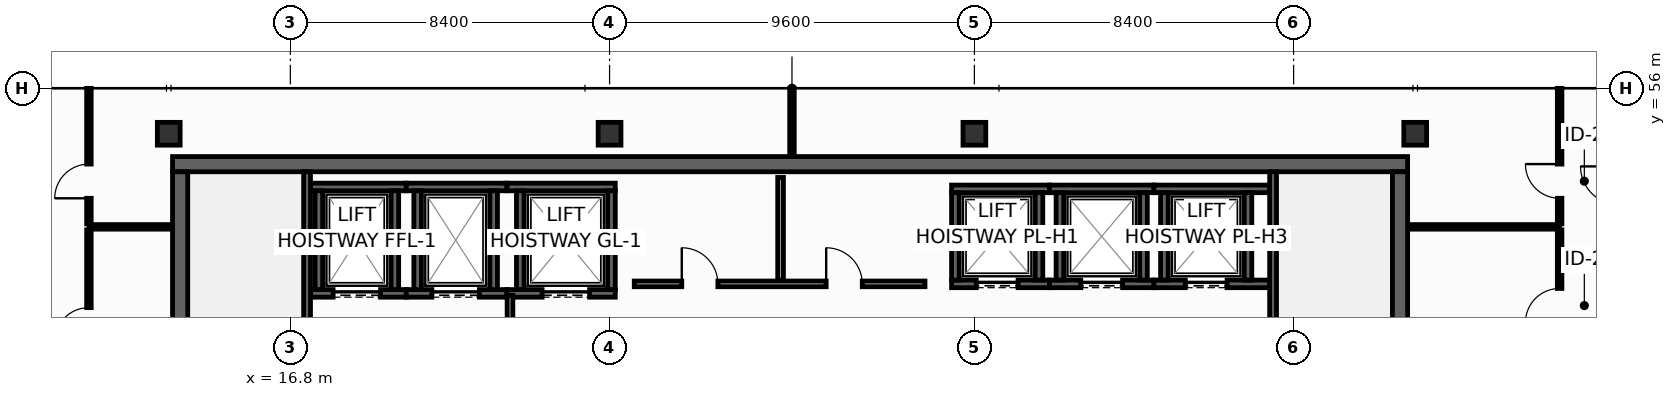
"""IFC4 building model, lengths in metres.
Left out: names, types, materials, properties, quantities, classifications, styles, units other than length and angle.
Written with IfcOpenShell. Run it as: python <this file> out.ifc"""

import sys

from ifc_helpers import new_model, si_unit, direction, frame, frame_2d, origin, origin_2d, place, context, subcontext, project, spatial, rectangle, hollow_rectangle, extrude, element, fill, save


model = new_model("IFC4")
c1 = context("Model", 3, precision=1e-05, world=origin(), true_north=direction((0.0, 1.0)))
c2 = subcontext(c1, "Body", "Model", "MODEL_VIEW")
j1 = project(units=[si_unit("LENGTHUNIT", "METRE"), si_unit("PLANEANGLEUNIT", "RADIAN")], contexts=[c1])
p1 = place(None, origin())
s1 = spatial("IfcSite", under=j1, at=p1, CompositionType="ELEMENT")
p2 = place(p1, origin())
s2 = spatial("IfcBuilding", under=s1, at=p2, CompositionType="ELEMENT")
p3 = place(p2, frame((0.0, 0.0, 302.8)))
s3 = spatial("IfcBuildingStorey", under=s2, at=p3, CompositionType="ELEMENT", Elevation=302.8)
p4 = place(p3, frame((13.7, 54.0, 0.0), z_axis=(0.0, 0.0, 1.0), x_axis=(1.0, 0.0, 0.0)))
e1 = element("IfcWall", 1, at=p4, inside=s3, PredefinedType="SHEAR", context=c2, shape_type="SweptSolid", body=[
    extrude(rectangle(XDim=32.5, YDim=0.4, at=frame_2d((16.25, 0.0))), origin(), (0.0, 0.0, 1.0), 3.55),
])
for number, where, z_axis, x_axis in (
    (2, (13.9, 43.4, 0.0), (0.0, 0.0, 1.0), (0.0, 1.0, 0.0)),
    (3, (46.0, 43.4, 0.0), (0.0, 0.0, 1.0), (0.0, 1.0, 0.0)),
):
    element("IfcWall", number, at=place(p3, frame(where, z_axis=z_axis, x_axis=x_axis)), inside=s3, PredefinedType="SHEAR", context=c2, shape_type="SweptSolid", body=[
        extrude(rectangle(XDim=10.4, YDim=0.4, at=frame_2d((5.2, 0.0))), origin(), (0.0, 0.0, 1.0), 3.55),
    ])
for number, where, z_axis, x_axis in (
    (4, (13.6, 54.8, 0.0), (0.0, 0.0, 1.0), (1.0, 0.0, 0.0)),
    (5, (25.2, 54.8, 0.0), (0.0, 0.0, 1.0), (1.0, 0.0, 0.0)),
    (6, (34.8, 54.8, 0.0), (0.0, 0.0, 1.0), (1.0, 0.0, 0.0)),
    (7, (46.4, 54.8, 0.0), (0.0, 0.0, 1.0), (1.0, 0.0, 0.0)),
):
    element("IfcColumn", number, at=place(p3, frame(where, z_axis=z_axis, x_axis=x_axis)), inside=s3, PredefinedType="COLUMN", context=c2, shape_type="SweptSolid", body=[
        extrude(hollow_rectangle(XDim=0.6, YDim=0.6, WallThickness=0.028, at=origin_2d()), origin(), (0.0, 0.0, 1.0), 3.8),
    ])
p5 = place(p3, frame((17.33, 50.6, 0.0), z_axis=(0.0, 0.0, 1.0), x_axis=(1.0, 0.0, 0.0)))
e8 = element("IfcWall", 8, at=p5, inside=s3, PredefinedType="SHEAR", context=c2, shape_type="SweptSolid", body=[
    extrude(rectangle(XDim=2.52, YDim=0.2, at=frame_2d((1.26, 0.0))), origin(), (0.0, 0.0, 1.0), 3.55),
])
p6 = place(p5, frame((0.595, 0.0, 0.0)))
e9 = element("IfcOpeningElement", 9, at=p6, cuts=e8, PredefinedType="OPENING", context=c2, shape_type="SweptSolid", body=[
    extrude(rectangle(XDim=1.25, YDim=2.3, at=frame_2d((0.625, 1.15))), frame((0.0, 0.11, 0.0), z_axis=(0.0, -1.0, 0.0), x_axis=(1.0, 0.0, 0.0)), (0.0, 0.0, 1.0), 0.22),
])
p7 = place(p3, frame((17.33, 53.4, 0.0), z_axis=(0.0, 0.0, 1.0), x_axis=(1.0, 0.0, 0.0)))
e10 = element("IfcWall", 10, at=p7, inside=s3, PredefinedType="SHEAR", context=c2, shape_type="SweptSolid", body=[
    extrude(rectangle(XDim=2.52, YDim=0.2, at=frame_2d((1.26, 0.0))), origin(), (0.0, 0.0, 1.0), 3.55),
])
for number, where, z_axis, x_axis in (
    (11, (17.55, 50.7, 0.0), (0.0, 0.0, 1.0), (0.0, 1.0, 0.0)),
    (12, (19.55, 50.7, 0.0), (0.0, 0.0, 1.0), (0.0, 1.0, 0.0)),
):
    element("IfcWall", number, at=place(p3, frame(where, z_axis=z_axis, x_axis=x_axis)), inside=s3, PredefinedType="SHEAR", context=c2, shape_type="SweptSolid", body=[
        extrude(rectangle(XDim=2.6, YDim=0.2, at=frame_2d((1.3, 0.0))), origin(), (0.0, 0.0, 1.0), 3.55),
    ])
p8 = place(p3, frame((19.85, 50.6, 0.0), z_axis=(0.0, 0.0, 1.0), x_axis=(1.0, 0.0, 0.0)))
e13 = element("IfcWall", 13, at=p8, inside=s3, PredefinedType="SHEAR", context=c2, shape_type="SweptSolid", body=[
    extrude(rectangle(XDim=2.65, YDim=0.2, at=frame_2d((1.325, 0.0))), origin(), (0.0, 0.0, 1.0), 3.55),
])
p9 = place(p8, frame((0.675, 0.0, 0.0)))
e14 = element("IfcOpeningElement", 14, at=p9, cuts=e13, PredefinedType="OPENING", context=c2, shape_type="SweptSolid", body=[
    extrude(rectangle(XDim=1.25, YDim=2.3, at=frame_2d((0.625, 1.15))), frame((0.0, 0.11, 0.0), z_axis=(0.0, -1.0, 0.0), x_axis=(1.0, 0.0, 0.0)), (0.0, 0.0, 1.0), 0.22),
])
p10 = place(p3, frame((19.85, 53.4, 0.0), z_axis=(0.0, 0.0, 1.0), x_axis=(1.0, 0.0, 0.0)))
e15 = element("IfcWall", 15, at=p10, inside=s3, PredefinedType="SHEAR", context=c2, shape_type="SweptSolid", body=[
    extrude(rectangle(XDim=2.65, YDim=0.2, at=frame_2d((1.325, 0.0))), origin(), (0.0, 0.0, 1.0), 3.55),
])
for number, where, z_axis, x_axis in (
    (16, (20.15, 50.7, 0.0), (0.0, 0.0, 1.0), (0.0, 1.0, 0.0)),
    (17, (22.15, 50.7, 0.0), (0.0, 0.0, 1.0), (0.0, 1.0, 0.0)),
):
    element("IfcWall", number, at=place(p3, frame(where, z_axis=z_axis, x_axis=x_axis)), inside=s3, PredefinedType="SHEAR", context=c2, shape_type="SweptSolid", body=[
        extrude(rectangle(XDim=2.6, YDim=0.2, at=frame_2d((1.3, 0.0))), origin(), (0.0, 0.0, 1.0), 3.55),
    ])
p11 = place(p3, frame((22.5, 50.6, 0.0), z_axis=(0.0, 0.0, 1.0), x_axis=(1.0, 0.0, 0.0)))
e18 = element("IfcWall", 18, at=p11, inside=s3, PredefinedType="SHEAR", context=c2, shape_type="SweptSolid", body=[
    extrude(rectangle(XDim=2.85, YDim=0.2, at=frame_2d((1.425, 0.0))), origin(), (0.0, 0.0, 1.0), 3.55),
])
p12 = place(p11, frame((0.925, 0.0, 0.0)))
e19 = element("IfcOpeningElement", 19, at=p12, cuts=e18, PredefinedType="OPENING", context=c2, shape_type="SweptSolid", body=[
    extrude(rectangle(XDim=1.25, YDim=2.3, at=frame_2d((0.625, 1.15))), frame((0.0, 0.11, 0.0), z_axis=(0.0, -1.0, 0.0), x_axis=(1.0, 0.0, 0.0)), (0.0, 0.0, 1.0), 0.22),
])
p13 = place(p3, frame((22.5, 53.4, 0.0), z_axis=(0.0, 0.0, 1.0), x_axis=(1.0, 0.0, 0.0)))
e20 = element("IfcWall", 20, at=p13, inside=s3, PredefinedType="SHEAR", context=c2, shape_type="SweptSolid", body=[
    extrude(rectangle(XDim=2.85, YDim=0.2, at=frame_2d((1.425, 0.0))), origin(), (0.0, 0.0, 1.0), 3.55),
])
for number, where, z_axis, x_axis in (
    (21, (22.85, 50.7, 0.0), (0.0, 0.0, 1.0), (0.0, 1.0, 0.0)),
    (22, (25.25, 50.7, 0.0), (0.0, 0.0, 1.0), (0.0, 1.0, 0.0)),
):
    element("IfcWall", number, at=place(p3, frame(where, z_axis=z_axis, x_axis=x_axis)), inside=s3, PredefinedType="SHEAR", context=c2, shape_type="SweptSolid", body=[
        extrude(rectangle(XDim=2.6, YDim=0.2, at=frame_2d((1.3, 0.0))), origin(), (0.0, 0.0, 1.0), 3.55),
    ])
p14 = place(p3, frame((34.2, 50.85, 0.0), z_axis=(0.0, 0.0, 1.0), x_axis=(1.0, 0.0, 0.0)))
e23 = element("IfcWall", 23, at=p14, inside=s3, PredefinedType="SHEAR", context=c2, shape_type="SweptSolid", body=[
    extrude(rectangle(XDim=2.575, YDim=0.2, at=frame_2d((1.288, 0.0))), origin(), (0.0, 0.0, 1.0), 3.55),
])
p15 = place(p14, frame((0.65, 0.0, 0.0)))
e24 = element("IfcOpeningElement", 24, at=p15, cuts=e23, PredefinedType="OPENING", context=c2, shape_type="SweptSolid", body=[
    extrude(rectangle(XDim=1.1, YDim=2.2, at=frame_2d((0.55, 1.1))), frame((0.0, 0.11, 0.0), z_axis=(0.0, -1.0, 0.0), x_axis=(1.0, 0.0, 0.0)), (0.0, 0.0, 1.0), 0.22),
])
p16 = place(p3, frame((34.2, 53.35, 0.0), z_axis=(0.0, 0.0, 1.0), x_axis=(1.0, 0.0, 0.0)))
e25 = element("IfcWall", 25, at=p16, inside=s3, PredefinedType="SHEAR", context=c2, shape_type="SweptSolid", body=[
    extrude(rectangle(XDim=2.575, YDim=0.2, at=frame_2d((1.288, 0.0))), origin(), (0.0, 0.0, 1.0), 3.55),
])
for number, where, z_axis, x_axis in (
    (26, (34.3, 50.95, 0.0), (0.0, 0.0, 1.0), (0.0, 1.0, 0.0)),
    (27, (36.5, 50.95, 0.0), (0.0, 0.0, 1.0), (0.0, 1.0, 0.0)),
):
    element("IfcWall", number, at=place(p3, frame(where, z_axis=z_axis, x_axis=x_axis)), inside=s3, PredefinedType="SHEAR", context=c2, shape_type="SweptSolid", body=[
        extrude(rectangle(XDim=2.3, YDim=0.2, at=frame_2d((1.15, 0.0))), origin(), (0.0, 0.0, 1.0), 3.55),
    ])
p17 = place(p3, frame((36.775, 50.85, 0.0), z_axis=(0.0, 0.0, 1.0), x_axis=(1.0, 0.0, 0.0)))
e28 = element("IfcWall", 28, at=p17, inside=s3, PredefinedType="SHEAR", context=c2, shape_type="SweptSolid", body=[
    extrude(rectangle(XDim=2.75, YDim=0.2, at=frame_2d((1.375, 0.0))), origin(), (0.0, 0.0, 1.0), 3.55),
])
p18 = place(p17, frame((0.825, 0.0, 0.0)))
e29 = element("IfcOpeningElement", 29, at=p18, cuts=e28, PredefinedType="OPENING", context=c2, shape_type="SweptSolid", body=[
    extrude(rectangle(XDim=1.1, YDim=2.2, at=frame_2d((0.55, 1.1))), frame((0.0, 0.11, 0.0), z_axis=(0.0, -1.0, 0.0), x_axis=(1.0, 0.0, 0.0)), (0.0, 0.0, 1.0), 0.22),
])
p19 = place(p3, frame((36.775, 53.35, 0.0), z_axis=(0.0, 0.0, 1.0), x_axis=(1.0, 0.0, 0.0)))
e30 = element("IfcWall", 30, at=p19, inside=s3, PredefinedType="SHEAR", context=c2, shape_type="SweptSolid", body=[
    extrude(rectangle(XDim=2.75, YDim=0.2, at=frame_2d((1.375, 0.0))), origin(), (0.0, 0.0, 1.0), 3.55),
])
for number, where, z_axis, x_axis in (
    (31, (37.05, 50.95, 0.0), (0.0, 0.0, 1.0), (0.0, 1.0, 0.0)),
    (32, (39.25, 50.95, 0.0), (0.0, 0.0, 1.0), (0.0, 1.0, 0.0)),
):
    element("IfcWall", number, at=place(p3, frame(where, z_axis=z_axis, x_axis=x_axis)), inside=s3, PredefinedType="SHEAR", context=c2, shape_type="SweptSolid", body=[
        extrude(rectangle(XDim=2.3, YDim=0.2, at=frame_2d((1.15, 0.0))), origin(), (0.0, 0.0, 1.0), 3.55),
    ])
p20 = place(p3, frame((39.525, 50.85, 0.0), z_axis=(0.0, 0.0, 1.0), x_axis=(1.0, 0.0, 0.0)))
e33 = element("IfcWall", 33, at=p20, inside=s3, PredefinedType="SHEAR", context=c2, shape_type="SweptSolid", body=[
    extrude(rectangle(XDim=3.045, YDim=0.2, at=frame_2d((1.522, 0.0))), origin(), (0.0, 0.0, 1.0), 3.55),
])
p21 = place(p20, frame((0.825, 0.0, 0.0)))
e34 = element("IfcOpeningElement", 34, at=p21, cuts=e33, PredefinedType="OPENING", context=c2, shape_type="SweptSolid", body=[
    extrude(rectangle(XDim=1.1, YDim=2.2, at=frame_2d((0.55, 1.1))), frame((0.0, 0.11, 0.0), z_axis=(0.0, -1.0, 0.0), x_axis=(1.0, 0.0, 0.0)), (0.0, 0.0, 1.0), 0.22),
])
p22 = place(p3, frame((39.525, 53.35, 0.0), z_axis=(0.0, 0.0, 1.0), x_axis=(1.0, 0.0, 0.0)))
e35 = element("IfcWall", 35, at=p22, inside=s3, PredefinedType="SHEAR", context=c2, shape_type="SweptSolid", body=[
    extrude(rectangle(XDim=3.045, YDim=0.2, at=frame_2d((1.522, 0.0))), origin(), (0.0, 0.0, 1.0), 3.55),
])
for number, where, z_axis, x_axis in (
    (36, (39.8, 50.95, 0.0), (0.0, 0.0, 1.0), (0.0, 1.0, 0.0)),
    (37, (42.0, 50.95, 0.0), (0.0, 0.0, 1.0), (0.0, 1.0, 0.0)),
):
    element("IfcWall", number, at=place(p3, frame(where, z_axis=z_axis, x_axis=x_axis)), inside=s3, PredefinedType="SHEAR", context=c2, shape_type="SweptSolid", body=[
        extrude(rectangle(XDim=2.3, YDim=0.2, at=frame_2d((1.15, 0.0))), origin(), (0.0, 0.0, 1.0), 3.55),
    ])
p23 = place(p3, frame((17.24, 43.4, 0.0), z_axis=(0.0, 0.0, 1.0), x_axis=(0.0, 1.0, 0.0)))
e38 = element("IfcWall", 38, at=p23, inside=s3, PredefinedType="SHEAR", context=c2, shape_type="SweptSolid", body=[
    extrude(rectangle(XDim=10.4, YDim=0.18, at=frame_2d((5.2, 0.0))), origin(), (0.0, 0.0, 1.0), 3.55),
])
p24 = place(p23, frame((0.16, 0.0, 0.0)))
e39 = element("IfcOpeningElement", 39, at=p24, cuts=e38, PredefinedType="OPENING", context=c2, shape_type="SweptSolid", body=[
    extrude(rectangle(XDim=1.0, YDim=2.15, at=frame_2d((0.5, 1.075))), frame((0.0, 0.1, 0.0), z_axis=(0.0, -1.0, 0.0), x_axis=(1.0, 0.0, 0.0)), (0.0, 0.0, 1.0), 0.2),
])
p25 = place(p3, frame((42.66, 53.8, 0.0), z_axis=(0.0, 0.0, 1.0), x_axis=(0.0, -1.0, 0.0)))
e40 = element("IfcWall", 40, at=p25, inside=s3, PredefinedType="SHEAR", context=c2, shape_type="SweptSolid", body=[
    extrude(rectangle(XDim=10.4, YDim=0.18, at=frame_2d((5.2, 0.0))), origin(), (0.0, 0.0, 1.0), 3.55),
])
p26 = place(p25, frame((8.99, 0.0, 0.0)))
e41 = element("IfcOpeningElement", 41, at=p26, cuts=e40, PredefinedType="OPENING", context=c2, shape_type="SweptSolid", body=[
    extrude(rectangle(XDim=1.1, YDim=2.15, at=frame_2d((0.55, 1.075))), frame((0.0, 0.1, 0.0), z_axis=(0.0, -1.0, 0.0), x_axis=(1.0, 0.0, 0.0)), (0.0, 0.0, 1.0), 0.2),
])
p27 = place(p3, frame((22.58, 50.55, 0.0), z_axis=(0.0, 0.0, 1.0), x_axis=(0.0, -1.0, 0.0)))
e42 = element("IfcWall", 42, at=p27, inside=s3, PredefinedType="PARTITIONING", context=c2, shape_type="SweptSolid", body=[
    extrude(rectangle(XDim=5.33, YDim=0.15, at=frame_2d((2.665, 0.0))), origin(), (0.0, 0.0, 1.0), 3.55),
])
p28 = place(p27, frame((1.8, 0.0, 0.0)))
e43 = element("IfcOpeningElement", 43, at=p28, cuts=e42, PredefinedType="OPENING", context=c2, shape_type="SweptSolid", body=[
    extrude(rectangle(XDim=1.1, YDim=2.15, at=frame_2d((0.55, 1.075))), frame((0.0, 0.085, 0.0), z_axis=(0.0, -1.0, 0.0), x_axis=(1.0, 0.0, 0.0)), (0.0, 0.0, 1.0), 0.17),
])
p29 = place(p3, frame((25.85, 50.85, 0.0), z_axis=(0.0, 0.0, 1.0), x_axis=(1.0, 0.0, 0.0)))
e44 = element("IfcWall", 44, at=p29, inside=s3, PredefinedType="PARTITIONING", context=c2, shape_type="SweptSolid", body=[
    extrude(rectangle(XDim=7.65, YDim=0.15, at=frame_2d((3.825, 0.0))), origin(), (0.0, 0.0, 1.0), 3.55),
])
p30 = place(p29, frame((1.25, 0.0, 0.0)))
e45 = element("IfcOpeningElement", 45, at=p30, cuts=e44, PredefinedType="OPENING", context=c2, shape_type="SweptSolid", body=[
    extrude(rectangle(XDim=0.95, YDim=2.15, at=frame_2d((0.475, 1.075))), frame((0.0, 0.085, 0.0), z_axis=(0.0, -1.0, 0.0), x_axis=(1.0, 0.0, 0.0)), (0.0, 0.0, 1.0), 0.17),
])
p31 = place(p29, frame((5.05, 0.0, 0.0)))
e46 = element("IfcOpeningElement", 46, at=p31, cuts=e44, PredefinedType="OPENING", context=c2, shape_type="SweptSolid", body=[
    extrude(rectangle(XDim=0.95, YDim=2.15, at=frame_2d((0.475, 1.075))), frame((0.0, 0.085, 0.0), z_axis=(0.0, -1.0, 0.0), x_axis=(1.0, 0.0, 0.0)), (0.0, 0.0, 1.0), 0.17),
])
p32 = place(p3, frame((29.7, 50.95, 0.0), z_axis=(0.0, 0.0, 1.0), x_axis=(0.0, 1.0, 0.0)))
e47 = element("IfcWall", 47, at=p32, inside=s3, PredefinedType="PARTITIONING", context=c2, shape_type="SweptSolid", body=[
    extrude(rectangle(XDim=2.7, YDim=0.15, at=frame_2d((1.35, 0.0))), origin(), (0.0, 0.0, 1.0), 3.55),
])
p33 = place(p3, frame((46.22, 52.35, 0.0), z_axis=(0.0, 0.0, 1.0), x_axis=(1.0, 0.0, 0.0)))
e48 = element("IfcWall", 48, at=p33, inside=s3, PredefinedType="PARTITIONING", context=c2, shape_type="SweptSolid", body=[
    extrude(rectangle(XDim=3.98, YDim=0.12, at=frame_2d((1.99, 0.0))), origin(), (0.0, 0.0, 1.0), 3.55),
])
p34 = place(p3, frame((11.5, 52.35, 0.0), z_axis=(0.0, 0.0, 1.0), x_axis=(1.0, 0.0, 0.0)))
e49 = element("IfcWall", 49, at=p34, inside=s3, PredefinedType="PARTITIONING", context=c2, shape_type="SweptSolid", body=[
    extrude(rectangle(XDim=2.18, YDim=0.12, at=frame_2d((1.09, 0.0))), origin(), (0.0, 0.0, 1.0), 3.55),
])
p35 = place(p3, frame((30.0, 54.22, 0.0), z_axis=(0.0, 0.0, 1.0), x_axis=(0.0, 1.0, 0.0)))
e50 = element("IfcWall", 50, at=p35, inside=s3, PredefinedType="PARTITIONING", context=c2, shape_type="SweptSolid", body=[
    extrude(rectangle(XDim=1.775, YDim=0.12, at=frame_2d((0.888, 0.0))), origin(), (0.0, 0.0, 1.0), 2.935),
])
p36 = place(p3, frame((50.2, 48.29, 0.0), z_axis=(0.0, 0.0, 1.0), x_axis=(0.0, 1.0, 0.0)))
e51 = element("IfcWall", 51, at=p36, inside=s3, PredefinedType="PARTITIONING", context=c2, shape_type="SweptSolid", body=[
    extrude(rectangle(XDim=3.98, YDim=0.12, at=frame_2d((1.99, 0.0))), origin(), (0.0, 0.0, 1.0), 3.55),
])
p37 = place(p36, frame((1.54, 0.0, 0.0)))
e52 = element("IfcOpeningElement", 52, at=p37, cuts=e51, PredefinedType="OPENING", context=c2, shape_type="SweptSolid", body=[
    extrude(rectangle(XDim=0.9, YDim=2.1, at=frame_2d((0.45, 1.05))), frame((0.0, 0.07, 0.0), z_axis=(0.0, -1.0, 0.0), x_axis=(1.0, 0.0, 0.0)), (0.0, 0.0, 1.0), 0.14),
])
p38 = place(p3, frame((50.2, 52.43, 0.0), z_axis=(0.0, 0.0, 1.0), x_axis=(0.0, 1.0, 0.0)))
e53 = element("IfcWall", 53, at=p38, inside=s3, PredefinedType="PARTITIONING", context=c2, shape_type="SweptSolid", body=[
    extrude(rectangle(XDim=3.565, YDim=0.12, at=frame_2d((1.783, 0.0))), origin(), (0.0, 0.0, 1.0), 2.935),
])
p39 = place(p38, frame((0.672, 0.0, 0.0)))
e54 = element("IfcOpeningElement", 54, at=p39, cuts=e53, PredefinedType="OPENING", context=c2, shape_type="SweptSolid", body=[
    extrude(rectangle(XDim=0.9, YDim=2.1, at=frame_2d((0.45, 1.05))), frame((0.0, 0.07, 0.0), z_axis=(0.0, -1.0, 0.0), x_axis=(1.0, 0.0, 0.0)), (0.0, 0.0, 1.0), 0.14),
])
p40 = place(p3, frame((11.5, 52.43, 0.0), z_axis=(0.0, 0.0, 1.0), x_axis=(0.0, 1.0, 0.0)))
e55 = element("IfcWall", 55, at=p40, inside=s3, PredefinedType="PARTITIONING", context=c2, shape_type="SweptSolid", body=[
    extrude(rectangle(XDim=3.565, YDim=0.12, at=frame_2d((1.783, 0.0))), origin(), (0.0, 0.0, 1.0), 2.935),
])
p41 = place(p40, frame((0.672, 0.0, 0.0)))
e56 = element("IfcOpeningElement", 56, at=p41, cuts=e55, PredefinedType="OPENING", context=c2, shape_type="SweptSolid", body=[
    extrude(rectangle(XDim=0.9, YDim=2.1, at=frame_2d((0.45, 1.05))), frame((0.0, 0.07, 0.0), z_axis=(0.0, -1.0, 0.0), x_axis=(1.0, 0.0, 0.0)), (0.0, 0.0, 1.0), 0.14),
])
p42 = place(p3, frame((11.5, 47.28, 0.0), z_axis=(0.0, 0.0, 1.0), x_axis=(0.0, 1.0, 0.0)))
e57 = element("IfcWall", 57, at=p42, inside=s3, PredefinedType="PARTITIONING", context=c2, shape_type="SweptSolid", body=[
    extrude(rectangle(XDim=4.99, YDim=0.12, at=frame_2d((2.495, 0.0))), origin(), (0.0, 0.0, 1.0), 3.55),
])
p43 = place(p42, frame((2.045, 0.0, 0.0)))
e58 = element("IfcOpeningElement", 58, at=p43, cuts=e57, PredefinedType="OPENING", context=c2, shape_type="SweptSolid", body=[
    extrude(rectangle(XDim=0.9, YDim=2.1, at=frame_2d((0.45, 1.05))), frame((0.0, 0.07, 0.0), z_axis=(0.0, -1.0, 0.0), x_axis=(1.0, 0.0, 0.0)), (0.0, 0.0, 1.0), 0.14),
])
p44 = place(p6, origin())
e59 = element("IfcDoor", 59, at=p44, inside=s3, OperationType="SLIDING_TO_LEFT", PredefinedType="DOOR", context=c2, shape_type="SweptSolid", body=[
    extrude(rectangle(XDim=1.25, YDim=2.3, at=frame_2d((0.625, 1.15))), frame((0.0, 0.025, 0.0), z_axis=(0.0, -1.0, 0.0), x_axis=(1.0, 0.0, 0.0)), (0.0, 0.0, 1.0), 0.05),
])
fill(e9, e59)
p45 = place(p9, origin())
e60 = element("IfcDoor", 60, at=p45, inside=s3, OperationType="SLIDING_TO_LEFT", PredefinedType="DOOR", context=c2, shape_type="SweptSolid", body=[
    extrude(rectangle(XDim=1.25, YDim=2.3, at=frame_2d((0.625, 1.15))), frame((0.0, 0.025, 0.0), z_axis=(0.0, -1.0, 0.0), x_axis=(1.0, 0.0, 0.0)), (0.0, 0.0, 1.0), 0.05),
])
fill(e14, e60)
p46 = place(p12, origin())
e61 = element("IfcDoor", 61, at=p46, inside=s3, OperationType="SLIDING_TO_LEFT", PredefinedType="DOOR", context=c2, shape_type="SweptSolid", body=[
    extrude(rectangle(XDim=1.25, YDim=2.3, at=frame_2d((0.625, 1.15))), frame((0.0, 0.025, 0.0), z_axis=(0.0, -1.0, 0.0), x_axis=(1.0, 0.0, 0.0)), (0.0, 0.0, 1.0), 0.05),
])
fill(e19, e61)
p47 = place(p15, origin())
e62 = element("IfcDoor", 62, at=p47, inside=s3, OperationType="SLIDING_TO_LEFT", PredefinedType="DOOR", context=c2, shape_type="SweptSolid", body=[
    extrude(rectangle(XDim=1.1, YDim=2.2, at=frame_2d((0.55, 1.1))), frame((0.0, 0.025, 0.0), z_axis=(0.0, -1.0, 0.0), x_axis=(1.0, 0.0, 0.0)), (0.0, 0.0, 1.0), 0.05),
])
fill(e24, e62)
p48 = place(p18, origin())
e63 = element("IfcDoor", 63, at=p48, inside=s3, OperationType="SLIDING_TO_LEFT", PredefinedType="DOOR", context=c2, shape_type="SweptSolid", body=[
    extrude(rectangle(XDim=1.1, YDim=2.2, at=frame_2d((0.55, 1.1))), frame((0.0, 0.025, 0.0), z_axis=(0.0, -1.0, 0.0), x_axis=(1.0, 0.0, 0.0)), (0.0, 0.0, 1.0), 0.05),
])
fill(e29, e63)
p49 = place(p21, origin())
e64 = element("IfcDoor", 64, at=p49, inside=s3, OperationType="SLIDING_TO_LEFT", PredefinedType="DOOR", context=c2, shape_type="SweptSolid", body=[
    extrude(rectangle(XDim=1.1, YDim=2.2, at=frame_2d((0.55, 1.1))), frame((0.0, 0.025, 0.0), z_axis=(0.0, -1.0, 0.0), x_axis=(1.0, 0.0, 0.0)), (0.0, 0.0, 1.0), 0.05),
])
fill(e34, e64)
p50 = place(p30, origin())
e65 = element("IfcDoor", 65, at=p50, inside=s3, OperationType="SINGLE_SWING_LEFT", PredefinedType="DOOR", context=c2, shape_type="SweptSolid", body=[
    extrude(rectangle(XDim=0.95, YDim=2.15, at=frame_2d((0.475, 1.075))), frame((0.0, 0.025, 0.0), z_axis=(0.0, -1.0, 0.0), x_axis=(1.0, 0.0, 0.0)), (0.0, 0.0, 1.0), 0.05),
])
fill(e45, e65)
p51 = place(p31, origin())
e66 = element("IfcDoor", 66, at=p51, inside=s3, OperationType="SINGLE_SWING_LEFT", PredefinedType="DOOR", context=c2, shape_type="SweptSolid", body=[
    extrude(rectangle(XDim=0.95, YDim=2.15, at=frame_2d((0.475, 1.075))), frame((0.0, 0.025, 0.0), z_axis=(0.0, -1.0, 0.0), x_axis=(1.0, 0.0, 0.0)), (0.0, 0.0, 1.0), 0.05),
])
fill(e46, e66)
p52 = place(p37, origin())
e67 = element("IfcDoor", 67, at=p52, inside=s3, OperationType="SINGLE_SWING_LEFT", PredefinedType="DOOR", context=c2, shape_type="SweptSolid", body=[
    extrude(rectangle(XDim=0.9, YDim=2.1, at=frame_2d((0.45, 1.05))), frame((0.0, 0.025, 0.0), z_axis=(0.0, -1.0, 0.0), x_axis=(1.0, 0.0, 0.0)), (0.0, 0.0, 1.0), 0.05),
])
fill(e52, e67)
p53 = place(p39, origin())
e68 = element("IfcDoor", 68, at=p53, inside=s3, OperationType="SINGLE_SWING_RIGHT", PredefinedType="DOOR", context=c2, shape_type="SweptSolid", body=[
    extrude(rectangle(XDim=0.9, YDim=2.1, at=frame_2d((0.45, 1.05))), frame((0.0, 0.025, 0.0), z_axis=(0.0, -1.0, 0.0), x_axis=(1.0, 0.0, 0.0)), (0.0, 0.0, 1.0), 0.05),
])
fill(e54, e68)
p54 = place(p41, origin())
e69 = element("IfcDoor", 69, at=p54, inside=s3, OperationType="SINGLE_SWING_LEFT", PredefinedType="DOOR", context=c2, shape_type="SweptSolid", body=[
    extrude(rectangle(XDim=0.9, YDim=2.1, at=frame_2d((0.45, 1.05))), frame((0.0, 0.025, 0.0), z_axis=(0.0, -1.0, 0.0), x_axis=(1.0, 0.0, 0.0)), (0.0, 0.0, 1.0), 0.05),
])
fill(e56, e69)
p55 = place(p43, origin())
e70 = element("IfcDoor", 70, at=p55, inside=s3, OperationType="SINGLE_SWING_LEFT", PredefinedType="DOOR", context=c2, shape_type="SweptSolid", body=[
    extrude(rectangle(XDim=0.9, YDim=2.1, at=frame_2d((0.45, 1.05))), frame((0.0, 0.025, 0.0), z_axis=(0.0, -1.0, 0.0), x_axis=(1.0, 0.0, 0.0)), (0.0, 0.0, 1.0), 0.05),
])
fill(e58, e70)
save(model, sys.argv[1])
